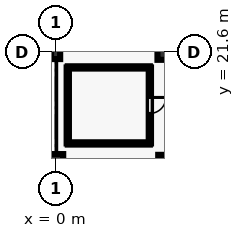
"""IFC4 building model, lengths in metres.
Left out: names, types, materials, properties, quantities, classifications, styles, units other than length and angle.
Written with IfcOpenShell. Run it as: python <this file> out.ifc"""

import sys

from ifc_helpers import new_model, si_unit, direction, frame, frame_2d, origin, origin_2d, place, context, subcontext, project, spatial, rectangle, circle, extrude, element, fill, save


model = new_model("IFC4")
c1 = context("Model", 3, precision=1e-05, world=origin(), true_north=direction((0.0, 1.0)))
c2 = subcontext(c1, "Body", "Model", "MODEL_VIEW")
j1 = project(units=[si_unit("LENGTHUNIT", "METRE"), si_unit("PLANEANGLEUNIT", "RADIAN")], contexts=[c1])
p1 = place(None, origin())
s1 = spatial("IfcSite", under=j1, at=p1, CompositionType="ELEMENT")
p2 = place(p1, origin())
s2 = spatial("IfcBuilding", under=s1, at=p2, CompositionType="ELEMENT")
p3 = place(p2, origin())
s3 = spatial("IfcBuildingStorey", under=s2, at=p3, CompositionType="ELEMENT", Elevation=0.0)
p4 = place(p3, frame((0.0, 14.4, 0.0), z_axis=(0.0, 0.0, 1.0), x_axis=(1.0, 0.0, 0.0)))
e1 = element("IfcColumn", 1, at=p4, inside=s3, PredefinedType="COLUMN", context=c2, shape_type="SweptSolid", body=[
    extrude(circle(Radius=0.5, at=origin_2d()), origin(), (0.0, 0.0, 1.0), 5.4),
])
p5 = place(p3, frame((0.0, 21.6, 0.0), z_axis=(0.0, 0.0, 1.0), x_axis=(1.0, 0.0, 0.0)))
e2 = element("IfcColumn", 2, at=p5, inside=s3, PredefinedType="COLUMN", context=c2, shape_type="SweptSolid", body=[
    extrude(rectangle(XDim=0.6, YDim=0.9, at=origin_2d()), origin(), (0.0, 0.0, 1.0), 5.4),
])
p6 = place(p3, frame((7.2, 14.4, 0.0), z_axis=(0.0, 0.0, 1.0), x_axis=(1.0, 0.0, 0.0)))
e3 = element("IfcColumn", 3, at=p6, inside=s3, PredefinedType="COLUMN", context=c2, shape_type="SweptSolid", body=[
    extrude(rectangle(XDim=0.9, YDim=0.9, at=origin_2d()), origin(), (0.0, 0.0, 1.0), 5.4),
])
p7 = place(p3, frame((7.2, 21.6, 0.0), z_axis=(0.0, 0.0, 1.0), x_axis=(1.0, 0.0, 0.0)))
e4 = element("IfcColumn", 4, at=p7, inside=s3, PredefinedType="COLUMN", context=c2, shape_type="SweptSolid", body=[
    extrude(circle(Radius=0.5, at=origin_2d()), origin(), (0.0, 0.0, 1.0), 5.4),
])
p8 = place(p3, frame((0.8, 15.6, 0.0), z_axis=(0.0, 0.0, 1.0), x_axis=(1.0, 0.0, 0.0)))
e5 = element("IfcWall", 5, at=p8, inside=s3, PredefinedType="PARTITIONING", context=c2, shape_type="SweptSolid", body=[
    extrude(rectangle(XDim=5.4, YDim=0.15, at=frame_2d((2.7, 0.0))), origin(), (0.0, 0.0, 1.0), 4.1),
])
p9 = place(p3, frame((6.2, 15.6, 0.0), z_axis=(0.0, 0.0, 1.0), x_axis=(0.0, 1.0, 0.0)))
e6 = element("IfcWall", 6, at=p9, inside=s3, PredefinedType="PARTITIONING", context=c2, shape_type="SweptSolid", body=[
    extrude(rectangle(XDim=5.0, YDim=0.15, at=frame_2d((2.5, 0.0))), origin(), (0.0, 0.0, 1.0), 4.1),
])
p10 = place(p9, frame((1.975, 0.0, 0.0)))
e7 = element("IfcOpeningElement", 7, at=p10, cuts=e6, PredefinedType="OPENING", context=c2, shape_type="SweptSolid", body=[
    extrude(rectangle(XDim=1.05, YDim=2.2, at=frame_2d((0.525, 1.1))), frame((0.0, 0.085, 0.0), z_axis=(0.0, -1.0, 0.0), x_axis=(1.0, 0.0, 0.0)), (0.0, 0.0, 1.0), 0.17),
])
p11 = place(p3, frame((6.2, 20.6, 0.0), z_axis=(0.0, 0.0, 1.0), x_axis=(-1.0, 0.0, 0.0)))
e8 = element("IfcWall", 8, at=p11, inside=s3, PredefinedType="PARTITIONING", context=c2, shape_type="SweptSolid", body=[
    extrude(rectangle(XDim=5.4, YDim=0.15, at=frame_2d((2.7, 0.0))), origin(), (0.0, 0.0, 1.0), 4.1),
])
p12 = place(p3, frame((0.8, 20.6, 0.0), z_axis=(0.0, 0.0, 1.0), x_axis=(0.0, -1.0, 0.0)))
e9 = element("IfcWall", 9, at=p12, inside=s3, PredefinedType="PARTITIONING", context=c2, shape_type="SweptSolid", body=[
    extrude(rectangle(XDim=5.0, YDim=0.15, at=frame_2d((2.5, 0.0))), origin(), (0.0, 0.0, 1.0), 4.1),
])
p13 = place(p10, frame((1.05, 0.0, 0.0), z_axis=(0.0, 0.0, 1.0), x_axis=(-1.0, 0.0, 0.0)))
e10 = element("IfcDoor", 10, at=p13, inside=s3, OperationType="SINGLE_SWING_RIGHT", PredefinedType="DOOR", context=c2, shape_type="SweptSolid", body=[
    extrude(rectangle(XDim=1.05, YDim=2.2, at=frame_2d((0.525, 1.1))), frame((0.0, 0.025, 0.0), z_axis=(0.0, -1.0, 0.0), x_axis=(1.0, 0.0, 0.0)), (0.0, 0.0, 1.0), 0.05),
])
fill(e7, e10)
save(model, sys.argv[1])
